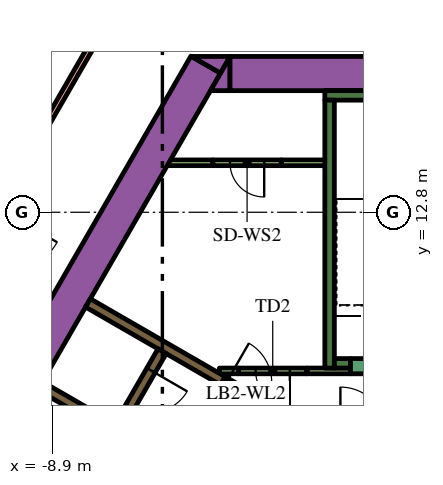
"""IFC4 building model, lengths in metres.
Left out: names, types, materials, properties, quantities, classifications, styles, units other than length and angle.
Written with IfcOpenShell. Run it as: python <this file> out.ifc"""

import sys

from ifc_helpers import new_model, si_unit, direction, frame, frame_2d, origin, place, context, subcontext, project, spatial, polyline, rectangle, outline, extrude, element, fill, save


model = new_model("IFC4")
c1 = context("Model", 3, precision=1e-05, world=origin(), true_north=direction((0.0, 1.0)))
c2 = subcontext(c1, "Body", "Model", "MODEL_VIEW")
j1 = project(units=[si_unit("LENGTHUNIT", "METRE"), si_unit("PLANEANGLEUNIT", "RADIAN")], contexts=[c1])
p1 = place(None, origin())
s1 = spatial("IfcSite", under=j1, at=p1, CompositionType="ELEMENT")
p2 = place(p1, origin())
s2 = spatial("IfcBuilding", under=s1, at=p2, CompositionType="ELEMENT")
p3 = place(p2, frame((0.0, 0.0, 134.4)))
s3 = spatial("IfcBuildingStorey", under=s2, at=p3, CompositionType="ELEMENT", Elevation=134.4)
p4 = place(p3, frame((-14.268, 0.387, 0.0), z_axis=(0.0, 0.0, 1.0), x_axis=(0.499994617707, 0.866028511231, 0.0)))
e1 = element("IfcWall", 1, at=p4, inside=s3, PredefinedType="SOLIDWALL", context=c2, shape_type="SweptSolid", body=[
    extrude(rectangle(XDim=18.817, YDim=0.9, at=frame_2d((9.409, 0.0))), origin(), (0.0, 0.0, 1.0), 7.2),
])
p5 = place(p3, origin())
e2 = element("IfcWall", 2, at=p5, inside=s3, PredefinedType="SOLIDWALL", context=c2, shape_type="SweptSolid", body=[
    extrude(outline(polyline([(-4.215, 16.9), (-4.469, 16.46), (-5.231, 16.9), (-4.215, 16.9)])), origin(), (0.0, 0.0, 1.0), 7.2),
])
p6 = place(p3, frame((-4.224, 16.45, 0.0), z_axis=(0.0, 0.0, 1.0), x_axis=(1.0, 0.0, 0.0)))
e3 = element("IfcWall", 3, at=p6, inside=s3, PredefinedType="SOLIDWALL", context=c2, shape_type="SweptSolid", body=[
    extrude(rectangle(XDim=9.488, YDim=0.9, at=frame_2d((4.744, 0.0))), origin(), (0.0, 0.0, 1.0), 7.2),
])
e4 = element("IfcWall", 4, at=p5, inside=s3, PredefinedType="SOLIDWALL", context=c2, shape_type="SweptSolid", body=[
    extrude(outline(polyline([(-4.734, 16.0), (-4.226, 16.88), (-4.226, 16.0), (-4.734, 16.0)])), origin(), (0.0, 0.0, 1.0), 7.2),
])
p7 = place(p3, frame((-1.725, 15.875, 0.0), z_axis=(0.0, 0.0, 1.0), x_axis=(1.0, 0.0, 0.0)))
e5 = element("IfcWall", 5, at=p7, inside=s3, PredefinedType="SOLIDWALL", context=c2, shape_type="SweptSolid", body=[
    extrude(rectangle(XDim=3.45, YDim=0.25, at=frame_2d((1.725, 0.0))), origin(), (0.0, 0.0, 1.0), 7.2),
])
p8 = place(p3, frame((-1.6, 8.7, 0.0), z_axis=(0.0, 0.0, 1.0), x_axis=(0.0, 1.0, 0.0)))
e6 = element("IfcWall", 6, at=p8, inside=s3, PredefinedType="SOLIDWALL", context=c2, shape_type="SweptSolid", body=[
    extrude(rectangle(XDim=7.05, YDim=0.25, at=frame_2d((3.525, 0.0))), origin(), (0.0, 0.0, 1.0), 7.2),
])
p9 = place(p3, frame((-1.475, 8.825, 0.0), z_axis=(0.0, 0.0, 1.0), x_axis=(1.0, 0.0, 0.0)))
e7 = element("IfcWall", 7, at=p9, inside=s3, PredefinedType="SOLIDWALL", context=c2, shape_type="SweptSolid", body=[
    extrude(rectangle(XDim=0.425, YDim=0.25, at=frame_2d((0.212, 0.0))), origin(), (0.0, 0.0, 1.0), 7.2),
])
e8 = element("IfcWall", 8, at=p5, inside=s3, PredefinedType="SOLIDWALL", context=c2, shape_type="SweptSolid", body=[
    extrude(outline(polyline([(-3.128, 7.481), (-3.259, 7.557), (-3.134, 7.773), (-3.003, 7.698), (-3.128, 7.481)])), origin(), (0.0, 0.0, 1.0), 7.2),
])
p10 = place(p3, frame((-7.314, 7.132, 0.0), z_axis=(0.0, 0.0, 1.0), x_axis=(-0.866008176907, 0.50002983664, 0.0)))
e9 = element("IfcWall", 9, at=p10, inside=s3, PredefinedType="SOLIDWALL", context=c2, shape_type="SweptSolid", body=[
    extrude(rectangle(XDim=2.2, YDim=0.25, at=frame_2d((1.1, 0.0))), origin(), (0.0, 0.0, 1.0), 7.2),
])
p11 = place(p3, frame((-7.959, 10.415, 0.0), z_axis=(0.0, 0.0, 1.0), x_axis=(0.866020958405, -0.500007699544, 0.0)))
e10 = element("IfcWall", 10, at=p11, inside=s3, PredefinedType="SOLIDWALL", context=c2, shape_type="SweptSolid", body=[
    extrude(rectangle(XDim=4.1, YDim=0.25, at=frame_2d((2.05, 0.0))), origin(), (0.0, 0.0, 1.0), 7.2),
])
p12 = place(p3, frame((-3.997, 8.625, 0.0), z_axis=(0.0, 0.0, 1.0), x_axis=(-1.0, 0.0, 0.0)))
e11 = element("IfcWall", 11, at=p12, inside=s3, PredefinedType="PARTITIONING", context=c2, shape_type="SweptSolid", body=[
    extrude(rectangle(XDim=0.502, YDim=0.15, at=frame_2d((0.251, 0.0))), origin(), (0.0, 0.0, 1.0), 6.15),
])
p13 = place(p3, frame((-5.851, 14.102, 0.0), z_axis=(0.0, 0.0, 1.0), x_axis=(1.0, 0.0, 0.0)))
e12 = element("IfcWall", 12, at=p13, inside=s3, PredefinedType="PARTITIONING", context=c2, shape_type="SweptSolid", body=[
    extrude(rectangle(XDim=1.18, YDim=0.15, at=frame_2d((0.59, 0.0))), origin(), (0.0, 0.0, 1.0), 6.15),
])
p14 = place(p3, frame((-2.196, 8.625, 0.0), z_axis=(0.0, 0.0, 1.0), x_axis=(1.0, 0.0, 0.0)))
e13 = element("IfcWall", 13, at=p14, inside=s3, PredefinedType="PARTITIONING", context=c2, shape_type="SweptSolid", body=[
    extrude(rectangle(XDim=1.146, YDim=0.15, at=frame_2d((0.573, 0.0))), origin(), (0.0, 0.0, 1.0), 6.15),
])
p15 = place(p3, frame((-2.871, 14.102, 0.0), z_axis=(0.0, 0.0, 1.0), x_axis=(1.0, 0.0, 0.0)))
e14 = element("IfcWall", 14, at=p15, inside=s3, PredefinedType="PARTITIONING", context=c2, shape_type="SweptSolid", body=[
    extrude(rectangle(XDim=1.196, YDim=0.15, at=frame_2d((0.598, 0.0))), origin(), (0.0, 0.0, 1.0), 6.15),
])
p16 = place(p3, frame((-6.008, 9.144, 0.0), z_axis=(0.0, 0.0, 1.0), x_axis=(-0.500006956611, -0.866021387346, 0.0)))
e15 = element("IfcWall", 15, at=p16, inside=s3, PredefinedType="SOLIDWALL", context=c2, shape_type="SweptSolid", body=[
    extrude(rectangle(XDim=9.83, YDim=0.25, at=frame_2d((4.915, 0.0))), origin(), (0.0, 0.0, 1.0), 7.2),
])
p17 = place(p16, frame((0.585, 0.0, 0.0)))
e16 = element("IfcOpeningElement", 16, at=p17, cuts=e15, PredefinedType="OPENING", context=c2, shape_type="SweptSolid", body=[
    extrude(rectangle(XDim=1.1, YDim=2.1, at=frame_2d((0.55, 1.05))), frame((0.0, 0.135, 0.0), z_axis=(0.0, -1.0, 0.0), x_axis=(1.0, 0.0, 0.0)), (0.0, 0.0, 1.0), 0.27),
])
p18 = place(p16, frame((3.105, 0.0, 0.0)))
e17 = element("IfcOpeningElement", 17, at=p18, cuts=e15, PredefinedType="OPENING", context=c2, shape_type="SweptSolid", body=[
    extrude(rectangle(XDim=1.1, YDim=2.1, at=frame_2d((0.55, 1.05))), frame((0.0, 0.135, 0.0), z_axis=(0.0, -1.0, 0.0), x_axis=(1.0, 0.0, 0.0)), (0.0, 0.0, 1.0), 0.27),
])
p19 = place(p16, frame((6.985, 0.0, 0.0)))
e18 = element("IfcOpeningElement", 18, at=p19, cuts=e15, PredefinedType="OPENING", context=c2, shape_type="SweptSolid", body=[
    extrude(rectangle(XDim=0.9, YDim=2.1, at=frame_2d((0.45, 1.05))), frame((0.0, 0.135, 0.0), z_axis=(0.0, -1.0, 0.0), x_axis=(1.0, 0.0, 0.0)), (0.0, 0.0, 1.0), 0.27),
])
p20 = place(p3, frame((1.05, 8.75, 0.0), z_axis=(0.0, 0.0, 1.0), x_axis=(-1.0, 0.0, 0.0)))
e19 = element("IfcWall", 19, at=p20, inside=s3, PredefinedType="SOLIDWALL", context=c2, shape_type="SweptSolid", body=[
    extrude(rectangle(XDim=2.1, YDim=0.4, at=frame_2d((1.05, 0.0))), origin(), (0.0, 0.0, 1.0), 7.2),
])
p21 = place(p20, frame((0.45, 0.0, 0.0)))
e20 = element("IfcOpeningElement", 20, at=p21, cuts=e19, PredefinedType="OPENING", context=c2, shape_type="SweptSolid", body=[
    extrude(rectangle(XDim=1.2, YDim=2.1, at=frame_2d((0.6, 1.05))), frame((0.0, 0.21, 0.0), z_axis=(0.0, -1.0, 0.0), x_axis=(1.0, 0.0, 0.0)), (0.0, 0.0, 1.0), 0.42),
])
p22 = place(p3, frame((-2.196, 8.625, 0.0), z_axis=(0.0, 0.0, 1.0), x_axis=(-1.0, 0.0, 0.0)))
e21 = element("IfcWall", 21, at=p22, inside=s3, PredefinedType="PARTITIONING", context=c2, shape_type="SweptSolid", body=[
    extrude(rectangle(XDim=1.8, YDim=0.15, at=frame_2d((0.9, 0.0))), origin(), (0.0, 0.0, 1.0), 6.15),
])
p23 = place(p22, frame((0.45, 0.0, 0.0)))
e22 = element("IfcOpeningElement", 22, at=p23, cuts=e21, PredefinedType="OPENING", context=c2, shape_type="SweptSolid", body=[
    extrude(rectangle(XDim=0.9, YDim=2.1, at=frame_2d((0.45, 1.05))), frame((0.0, 0.085, 0.0), z_axis=(0.0, -1.0, 0.0), x_axis=(1.0, 0.0, 0.0)), (0.0, 0.0, 1.0), 0.17),
])
p24 = place(p3, frame((-4.409, 8.365, 0.0), z_axis=(0.0, 0.0, 1.0), x_axis=(0.866034573852, -0.49998411664, 0.0)))
e23 = element("IfcWall", 23, at=p24, inside=s3, PredefinedType="SOLIDWALL", context=c2, shape_type="SweptSolid", body=[
    extrude(rectangle(XDim=1.4, YDim=0.25, at=frame_2d((0.7, 0.0))), origin(), (0.0, 0.0, 1.0), 7.2),
])
p25 = place(p24, frame((0.1, 0.0, 0.0)))
e24 = element("IfcOpeningElement", 24, at=p25, cuts=e23, PredefinedType="OPENING", context=c2, shape_type="SweptSolid", body=[
    extrude(rectangle(XDim=1.2, YDim=2.1, at=frame_2d((0.6, 1.05))), frame((0.0, 0.135, 0.0), z_axis=(0.0, -1.0, 0.0), x_axis=(1.0, 0.0, 0.0)), (0.0, 0.0, 1.0), 0.27),
])
p26 = place(p3, frame((-2.871, 14.102, 0.0), z_axis=(0.0, 0.0, 1.0), x_axis=(-1.0, 0.0, 0.0)))
e25 = element("IfcWall", 25, at=p26, inside=s3, PredefinedType="PARTITIONING", context=c2, shape_type="SweptSolid", body=[
    extrude(rectangle(XDim=1.8, YDim=0.15, at=frame_2d((0.9, 0.0))), origin(), (0.0, 0.0, 1.0), 6.15),
])
p27 = place(p26, frame((0.45, 0.0, 0.0)))
e26 = element("IfcOpeningElement", 26, at=p27, cuts=e25, PredefinedType="OPENING", context=c2, shape_type="SweptSolid", body=[
    extrude(rectangle(XDim=0.9, YDim=2.1, at=frame_2d((0.45, 1.05))), frame((0.0, 0.085, 0.0), z_axis=(0.0, -1.0, 0.0), x_axis=(1.0, 0.0, 0.0)), (0.0, 0.0, 1.0), 0.17),
])
p28 = place(p3, frame((-6.639, 19.3, 0.0), z_axis=(0.0, 0.0, 1.0), x_axis=(-0.500001456469, -0.86602456289, 0.0)))
e27 = element("IfcWall", 27, at=p28, inside=s3, PredefinedType="PARTITIONING", context=c2, shape_type="SweptSolid", body=[
    extrude(rectangle(XDim=22.774, YDim=0.15, at=frame_2d((11.387, 0.0))), origin(), (0.0, 0.0, 1.0), 6.15),
])
p29 = place(p28, frame((10.487, 0.0, 0.0)))
e28 = element("IfcOpeningElement", 28, at=p29, cuts=e27, PredefinedType="OPENING", context=c2, shape_type="SweptSolid", body=[
    extrude(rectangle(XDim=1.8, YDim=2.1, at=frame_2d((0.9, 1.05))), frame((0.0, 0.085, 0.0), z_axis=(0.0, -1.0, 0.0), x_axis=(1.0, 0.0, 0.0)), (0.0, 0.0, 1.0), 0.17),
])
p30 = place(p28, frame((7.377, 0.0, 0.0)))
e29 = element("IfcOpeningElement", 29, at=p30, cuts=e27, PredefinedType="OPENING", context=c2, shape_type="SweptSolid", body=[
    extrude(rectangle(XDim=1.8, YDim=2.1, at=frame_2d((0.9, 1.05))), frame((0.0, 0.085, 0.0), z_axis=(0.0, -1.0, 0.0), x_axis=(1.0, 0.0, 0.0)), (0.0, 0.0, 1.0), 0.17),
])
p31 = place(p17, origin())
e30 = element("IfcDoor", 30, at=p31, inside=s3, OperationType="DOUBLE_DOOR_SLIDING", PredefinedType="DOOR", context=c2, shape_type="SweptSolid", body=[
    extrude(rectangle(XDim=1.1, YDim=2.1, at=frame_2d((0.55, 1.05))), frame((0.0, 0.025, 0.0), z_axis=(0.0, -1.0, 0.0), x_axis=(1.0, 0.0, 0.0)), (0.0, 0.0, 1.0), 0.05),
])
fill(e16, e30)
p32 = place(p23, origin())
e31 = element("IfcDoor", 31, at=p32, inside=s3, OperationType="SINGLE_SWING_LEFT", PredefinedType="DOOR", context=c2, shape_type="SweptSolid", body=[
    extrude(rectangle(XDim=0.9, YDim=2.1, at=frame_2d((0.45, 1.05))), frame((0.0, 0.025, 0.0), z_axis=(0.0, -1.0, 0.0), x_axis=(1.0, 0.0, 0.0)), (0.0, 0.0, 1.0), 0.05),
])
fill(e22, e31)
p33 = place(p25, origin())
e32 = element("IfcDoor", 32, at=p33, inside=s3, OperationType="SINGLE_SWING_LEFT", PredefinedType="DOOR", context=c2, shape_type="SweptSolid", body=[
    extrude(rectangle(XDim=1.2, YDim=2.1, at=frame_2d((0.6, 1.05))), frame((0.0, 0.025, 0.0), z_axis=(0.0, -1.0, 0.0), x_axis=(1.0, 0.0, 0.0)), (0.0, 0.0, 1.0), 0.05),
])
fill(e24, e32)
p34 = place(p27, origin())
e33 = element("IfcDoor", 33, at=p34, inside=s3, OperationType="SINGLE_SWING_LEFT", PredefinedType="DOOR", context=c2, shape_type="SweptSolid", body=[
    extrude(rectangle(XDim=0.9, YDim=2.1, at=frame_2d((0.45, 1.05))), frame((0.0, 0.025, 0.0), z_axis=(0.0, -1.0, 0.0), x_axis=(1.0, 0.0, 0.0)), (0.0, 0.0, 1.0), 0.05),
])
fill(e26, e33)
save(model, sys.argv[1])
